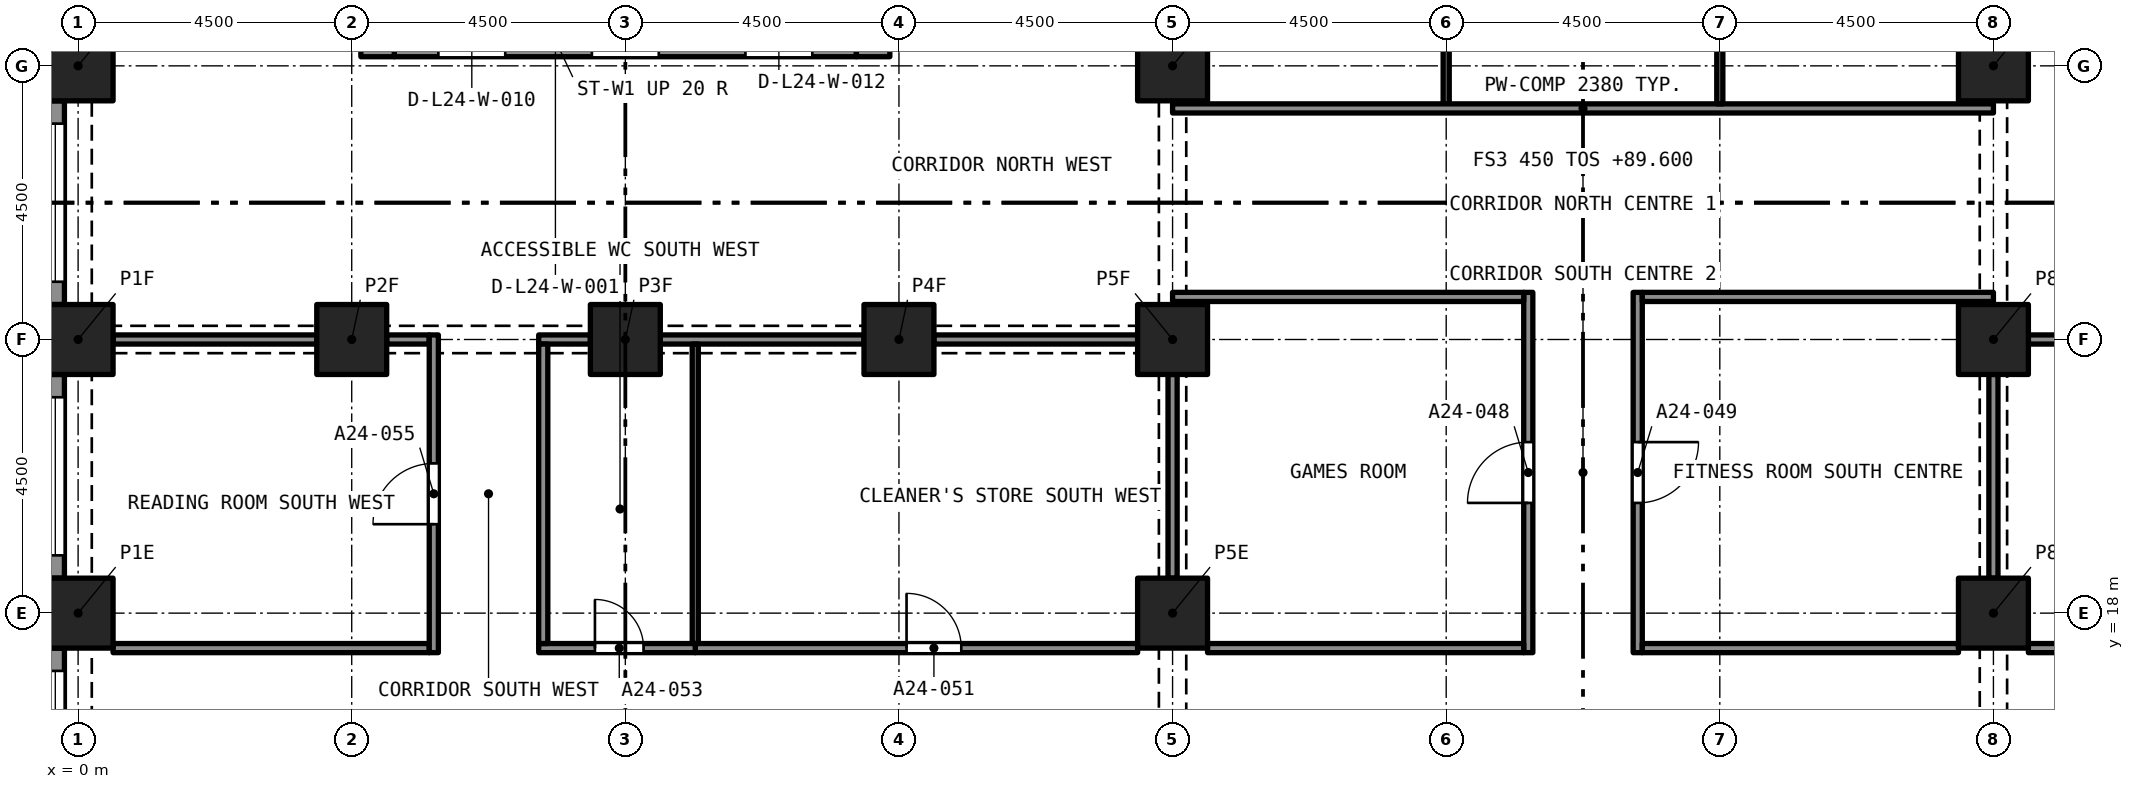
"""IFC4 building model, lengths in metres.
Left out: names, types, materials, properties, quantities, classifications, styles, units other than length and angle.
Written with IfcOpenShell. Run it as: python <this file> out.ifc"""

import sys

from ifc_helpers import new_model, si_unit, direction, frame, frame_2d, origin, origin_2d, place, context, subcontext, project, spatial, rectangle, extrude, element, fill, save


model = new_model("IFC4")
c1 = context("Model", 3, precision=1e-05, world=origin(), true_north=direction((0.0, 1.0)))
c2 = subcontext(c1, "Body", "Model", "MODEL_VIEW")
j1 = project(units=[si_unit("LENGTHUNIT", "METRE"), si_unit("PLANEANGLEUNIT", "RADIAN")], contexts=[c1])
p1 = place(None, origin())
s1 = spatial("IfcSite", under=j1, at=p1, CompositionType="ELEMENT")
p2 = place(p1, origin())
s2 = spatial("IfcBuilding", under=s1, at=p2, CompositionType="ELEMENT")
p3 = place(p2, frame((0.0, 0.0, 89.6)))
s3 = spatial("IfcBuildingStorey", under=s2, at=p3, CompositionType="ELEMENT", Elevation=89.6)
for number, where, z_axis, x_axis in (
    (1, (0.0, 18.0, 0.0), (0.0, 0.0, 1.0), (1.0, 0.0, 0.0)),
    (2, (18.0, 18.0, 0.0), (0.0, 0.0, 1.0), (1.0, 0.0, 0.0)),
    (3, (31.5, 18.0, 0.0), (0.0, 0.0, 1.0), (1.0, 0.0, 0.0)),
    (4, (0.0, 22.5, 0.0), (0.0, 0.0, 1.0), (1.0, 0.0, 0.0)),
    (5, (4.5, 22.5, 0.0), (0.0, 0.0, 1.0), (1.0, 0.0, 0.0)),
    (6, (9.0, 22.5, 0.0), (0.0, 0.0, 1.0), (1.0, 0.0, 0.0)),
    (7, (13.5, 22.5, 0.0), (0.0, 0.0, 1.0), (1.0, 0.0, 0.0)),
    (8, (18.0, 22.5, 0.0), (0.0, 0.0, 1.0), (1.0, 0.0, 0.0)),
    (9, (31.5, 22.5, 0.0), (0.0, 0.0, 1.0), (1.0, 0.0, 0.0)),
    (10, (0.0, 27.0, 0.0), (0.0, 0.0, 1.0), (1.0, 0.0, 0.0)),
    (11, (18.0, 27.0, 0.0), (0.0, 0.0, 1.0), (1.0, 0.0, 0.0)),
    (12, (31.5, 27.0, 0.0), (0.0, 0.0, 1.0), (1.0, 0.0, 0.0)),
):
    element("IfcColumn", number, at=place(p3, frame(where, z_axis=z_axis, x_axis=x_axis)), inside=s3, PredefinedType="COLUMN", context=c2, shape_type="SweptSolid", body=[
        extrude(rectangle(XDim=1.15, YDim=1.15, at=origin_2d()), origin(), (0.0, 0.0, 1.0), 3.2),
    ])
p4 = place(p3, frame((5.2, 27.425, 0.0), z_axis=(0.0, 0.0, 1.0), x_axis=(1.0, 0.0, 0.0)))
e13 = element("IfcWall", 13, at=p4, inside=s3, PredefinedType="SOLIDWALL", context=c2, shape_type="SweptSolid", body=[
    extrude(rectangle(XDim=7.6, YDim=0.55, at=frame_2d((3.8, 0.0))), origin(), (0.0, 0.0, 1.0), 3.2),
])
p5 = place(p4, frame((0.725, 0.0, 0.0)))
e14 = element("IfcOpeningElement", 14, at=p5, cuts=e13, PredefinedType="OPENING", context=c2, shape_type="SweptSolid", body=[
    extrude(rectangle(XDim=1.1, YDim=2.1, at=frame_2d((0.55, 1.05))), frame((0.0, 0.285, 0.0), z_axis=(0.0, -1.0, 0.0), x_axis=(1.0, 0.0, 0.0)), (0.0, 0.0, 1.0), 0.57),
])
p6 = place(p4, frame((3.25, 0.0, 0.0)))
e15 = element("IfcOpeningElement", 15, at=p6, cuts=e13, PredefinedType="OPENING", context=c2, shape_type="SweptSolid", body=[
    extrude(rectangle(XDim=1.1, YDim=2.1, at=frame_2d((0.55, 1.05))), frame((0.0, 0.285, 0.0), z_axis=(0.0, -1.0, 0.0), x_axis=(1.0, 0.0, 0.0)), (0.0, 0.0, 1.0), 0.57),
])
p7 = place(p4, frame((5.775, 0.0, 0.0)))
e16 = element("IfcOpeningElement", 16, at=p7, cuts=e13, PredefinedType="OPENING", context=c2, shape_type="SweptSolid", body=[
    extrude(rectangle(XDim=1.1, YDim=2.1, at=frame_2d((0.55, 1.05))), frame((0.0, 0.285, 0.0), z_axis=(0.0, -1.0, 0.0), x_axis=(1.0, 0.0, 0.0)), (0.0, 0.0, 1.0), 0.57),
])
p8 = place(p3, frame((4.925, 27.15, 0.0), z_axis=(0.0, 0.0, 1.0), x_axis=(0.0, 1.0, 0.0)))
e17 = element("IfcWall", 17, at=p8, inside=s3, PredefinedType="SOLIDWALL", context=c2, shape_type="SweptSolid", body=[
    extrude(rectangle(XDim=13.2, YDim=0.55, at=frame_2d((6.6, 0.0))), origin(), (0.0, 0.0, 1.0), 3.2),
])
p9 = place(p8, frame((8.8, 0.0, 0.0)))
e18 = element("IfcOpeningElement", 18, at=p9, cuts=e17, PredefinedType="OPENING", context=c2, shape_type="SweptSolid", body=[
    extrude(rectangle(XDim=1.2, YDim=2.1, at=frame_2d((0.6, 1.05))), frame((0.0, 0.285, 0.0), z_axis=(0.0, -1.0, 0.0), x_axis=(1.0, 0.0, 0.0)), (0.0, 0.0, 1.0), 0.57),
])
p10 = place(p3, frame((13.075, 27.15, 0.0), z_axis=(0.0, 0.0, 1.0), x_axis=(0.0, 1.0, 0.0)))
e19 = element("IfcWall", 19, at=p10, inside=s3, PredefinedType="SOLIDWALL", context=c2, shape_type="SweptSolid", body=[
    extrude(rectangle(XDim=13.2, YDim=0.55, at=frame_2d((6.6, 0.0))), origin(), (0.0, 0.0, 1.0), 3.2),
])
p11 = place(p10, frame((10.95, 0.0, 0.0)))
e20 = element("IfcOpeningElement", 20, at=p11, cuts=e19, PredefinedType="OPENING", context=c2, shape_type="SweptSolid", body=[
    extrude(rectangle(XDim=1.1, YDim=2.1, at=frame_2d((0.55, 1.05))), frame((0.0, 0.285, 0.0), z_axis=(0.0, -1.0, 0.0), x_axis=(1.0, 0.0, 0.0)), (0.0, 0.0, 1.0), 0.57),
])
p12 = place(p10, frame((8.8, 0.0, 0.0)))
e21 = element("IfcOpeningElement", 21, at=p12, cuts=e19, PredefinedType="OPENING", context=c2, shape_type="SweptSolid", body=[
    extrude(rectangle(XDim=1.2, YDim=2.1, at=frame_2d((0.6, 1.05))), frame((0.0, 0.285, 0.0), z_axis=(0.0, -1.0, 0.0), x_axis=(1.0, 0.0, 0.0)), (0.0, 0.0, 1.0), 0.57),
])
p13 = place(p3, frame((-0.375, 23.075, 0.0), z_axis=(0.0, 0.0, 1.0), x_axis=(0.0, 1.0, 0.0)))
e22 = element("IfcWall", 22, at=p13, inside=s3, PredefinedType="SOLIDWALL", context=c2, shape_type="SweptSolid", body=[
    extrude(rectangle(XDim=3.35, YDim=0.3, at=frame_2d((1.675, 0.0))), origin(), (0.0, 0.0, 1.0), 3.2),
])
p14 = place(p13, frame((0.375, 0.0, 0.45)))
e23 = element("IfcOpeningElement", 23, at=p14, cuts=e22, PredefinedType="OPENING", context=c2, shape_type="SweptSolid", body=[
    extrude(rectangle(XDim=2.6, YDim=1.95, at=frame_2d((1.3, 0.975))), frame((0.0, 0.16, 0.0), z_axis=(0.0, -1.0, 0.0), x_axis=(1.0, 0.0, 0.0)), (0.0, 0.0, 1.0), 0.32),
])
p15 = place(p3, frame((-0.375, 18.575, 0.0), z_axis=(0.0, 0.0, 1.0), x_axis=(0.0, 1.0, 0.0)))
e24 = element("IfcWall", 24, at=p15, inside=s3, PredefinedType="SOLIDWALL", context=c2, shape_type="SweptSolid", body=[
    extrude(rectangle(XDim=3.35, YDim=0.3, at=frame_2d((1.675, 0.0))), origin(), (0.0, 0.0, 1.0), 3.2),
])
p16 = place(p15, frame((0.375, 0.0, 0.45)))
e25 = element("IfcOpeningElement", 25, at=p16, cuts=e24, PredefinedType="OPENING", context=c2, shape_type="SweptSolid", body=[
    extrude(rectangle(XDim=2.6, YDim=1.95, at=frame_2d((1.3, 0.975))), frame((0.0, 0.16, 0.0), z_axis=(0.0, -1.0, 0.0), x_axis=(1.0, 0.0, 0.0)), (0.0, 0.0, 1.0), 0.32),
])
p17 = place(p3, frame((-0.375, 14.075, 0.0), z_axis=(0.0, 0.0, 1.0), x_axis=(0.0, 1.0, 0.0)))
e26 = element("IfcWall", 26, at=p17, inside=s3, PredefinedType="SOLIDWALL", context=c2, shape_type="SweptSolid", body=[
    extrude(rectangle(XDim=3.35, YDim=0.3, at=frame_2d((1.675, 0.0))), origin(), (0.0, 0.0, 1.0), 3.2),
])
p18 = place(p17, frame((0.375, 0.0, 0.45)))
e27 = element("IfcOpeningElement", 27, at=p18, cuts=e26, PredefinedType="OPENING", context=c2, shape_type="SweptSolid", body=[
    extrude(rectangle(XDim=2.6, YDim=1.95, at=frame_2d((1.3, 0.975))), frame((0.0, 0.16, 0.0), z_axis=(0.0, -1.0, 0.0), x_axis=(1.0, 0.0, 0.0)), (0.0, 0.0, 1.0), 0.32),
])
p19 = place(p3, frame((23.85, 17.35, 0.0), z_axis=(0.0, 0.0, 1.0), x_axis=(0.0, 1.0, 0.0)))
e28 = element("IfcWall", 28, at=p19, inside=s3, PredefinedType="PARTITIONING", context=c2, shape_type="SweptSolid", body=[
    extrude(rectangle(XDim=5.925, YDim=0.15, at=frame_2d((2.962, 0.0))), origin(), (0.0, 0.0, 1.0), 2.75),
])
p20 = place(p19, frame((2.462, 0.0, 0.0)))
e29 = element("IfcOpeningElement", 29, at=p20, cuts=e28, PredefinedType="OPENING", context=c2, shape_type="SweptSolid", body=[
    extrude(rectangle(XDim=1.0, YDim=2.1, at=frame_2d((0.5, 1.05))), frame((0.0, 0.085, 0.0), z_axis=(0.0, -1.0, 0.0), x_axis=(1.0, 0.0, 0.0)), (0.0, 0.0, 1.0), 0.17),
])
p21 = place(p3, frame((25.65, 23.275, 0.0), z_axis=(0.0, 0.0, 1.0), x_axis=(0.0, -1.0, 0.0)))
e30 = element("IfcWall", 30, at=p21, inside=s3, PredefinedType="PARTITIONING", context=c2, shape_type="SweptSolid", body=[
    extrude(rectangle(XDim=5.925, YDim=0.15, at=frame_2d((2.962, 0.0))), origin(), (0.0, 0.0, 1.0), 2.75),
])
p22 = place(p21, frame((2.462, 0.0, 0.0)))
e31 = element("IfcOpeningElement", 31, at=p22, cuts=e30, PredefinedType="OPENING", context=c2, shape_type="SweptSolid", body=[
    extrude(rectangle(XDim=1.0, YDim=2.1, at=frame_2d((0.5, 1.05))), frame((0.0, 0.085, 0.0), z_axis=(0.0, -1.0, 0.0), x_axis=(1.0, 0.0, 0.0)), (0.0, 0.0, 1.0), 0.17),
])
for number, where, z_axis, x_axis in (
    (32, (18.575, 17.425, 0.0), (0.0, 0.0, 1.0), (1.0, 0.0, 0.0)),
    (33, (25.725, 17.425, 0.0), (0.0, 0.0, 1.0), (1.0, 0.0, 0.0)),
):
    element("IfcWall", number, at=place(p3, frame(where, z_axis=z_axis, x_axis=x_axis)), inside=s3, PredefinedType="PARTITIONING", context=c2, shape_type="SweptSolid", body=[
        extrude(rectangle(XDim=5.2, YDim=0.15, at=frame_2d((2.6, 0.0))), origin(), (0.0, 0.0, 1.0), 2.75),
    ])
p23 = place(p3, frame((32.075, 17.425, 0.0), z_axis=(0.0, 0.0, 1.0), x_axis=(1.0, 0.0, 0.0)))
e34 = element("IfcWall", 34, at=p23, inside=s3, PredefinedType="PARTITIONING", context=c2, shape_type="SweptSolid", body=[
    extrude(rectangle(XDim=7.275, YDim=0.15, at=frame_2d((3.638, 0.0))), origin(), (0.0, 0.0, 1.0), 2.9),
])
p24 = place(p23, frame((2.9, 0.0, 0.0)))
e35 = element("IfcOpeningElement", 35, at=p24, cuts=e34, PredefinedType="OPENING", context=c2, shape_type="SweptSolid", body=[
    extrude(rectangle(XDim=0.9, YDim=2.1, at=frame_2d((0.45, 1.05))), frame((0.0, 0.085, 0.0), z_axis=(0.0, -1.0, 0.0), x_axis=(1.0, 0.0, 0.0)), (0.0, 0.0, 1.0), 0.17),
])
p25 = place(p3, frame((10.15, 17.425, 0.0), z_axis=(0.0, 0.0, 1.0), x_axis=(1.0, 0.0, 0.0)))
e36 = element("IfcWall", 36, at=p25, inside=s3, PredefinedType="PARTITIONING", context=c2, shape_type="SweptSolid", body=[
    extrude(rectangle(XDim=7.275, YDim=0.15, at=frame_2d((3.638, 0.0))), origin(), (0.0, 0.0, 1.0), 2.9),
])
p26 = place(p25, frame((3.475, 0.0, 0.0)))
e37 = element("IfcOpeningElement", 37, at=p26, cuts=e36, PredefinedType="OPENING", context=c2, shape_type="SweptSolid", body=[
    extrude(rectangle(XDim=0.9, YDim=2.1, at=frame_2d((0.45, 1.05))), frame((0.0, 0.085, 0.0), z_axis=(0.0, -1.0, 0.0), x_axis=(1.0, 0.0, 0.0)), (0.0, 0.0, 1.0), 0.17),
])
p27 = place(p3, frame((7.575, 17.425, 0.0), z_axis=(0.0, 0.0, 1.0), x_axis=(1.0, 0.0, 0.0)))
e38 = element("IfcWall", 38, at=p27, inside=s3, PredefinedType="PARTITIONING", context=c2, shape_type="SweptSolid", body=[
    extrude(rectangle(XDim=2.575, YDim=0.15, at=frame_2d((1.288, 0.0))), origin(), (0.0, 0.0, 1.0), 2.9),
])
p28 = place(p27, frame((0.925, 0.0, 0.0)))
e39 = element("IfcOpeningElement", 39, at=p28, cuts=e38, PredefinedType="OPENING", context=c2, shape_type="SweptSolid", body=[
    extrude(rectangle(XDim=0.8, YDim=2.1, at=frame_2d((0.4, 1.05))), frame((0.0, 0.085, 0.0), z_axis=(0.0, -1.0, 0.0), x_axis=(1.0, 0.0, 0.0)), (0.0, 0.0, 1.0), 0.17),
])
p29 = place(p3, frame((0.575, 17.425, 0.0), z_axis=(0.0, 0.0, 1.0), x_axis=(1.0, 0.0, 0.0)))
e40 = element("IfcWall", 40, at=p29, inside=s3, PredefinedType="PARTITIONING", context=c2, shape_type="SweptSolid", body=[
    extrude(rectangle(XDim=5.2, YDim=0.15, at=frame_2d((2.6, 0.0))), origin(), (0.0, 0.0, 1.0), 2.9),
])
p30 = place(p3, frame((22.5, 26.375, 0.0), z_axis=(0.0, 0.0, 1.0), x_axis=(0.0, 1.0, 0.0)))
e41 = element("IfcWall", 41, at=p30, inside=s3, PredefinedType="PARTITIONING", context=c2, shape_type="SweptSolid", body=[
    extrude(rectangle(XDim=10.125, YDim=0.1, at=frame_2d((5.062, 0.0))), origin(), (0.0, 0.0, 1.0), 2.75),
])
p31 = place(p3, frame((18.0, 26.3, 0.0), z_axis=(0.0, 0.0, 1.0), x_axis=(1.0, 0.0, 0.0)))
e42 = element("IfcWall", 42, at=p31, inside=s3, PredefinedType="PARTITIONING", context=c2, shape_type="SweptSolid", body=[
    extrude(rectangle(XDim=13.5, YDim=0.15, at=frame_2d((6.75, 0.0))), origin(), (0.0, 0.0, 1.0), 2.38),
])
p32 = place(p3, frame((27.0, 26.375, 0.0), z_axis=(0.0, 0.0, 1.0), x_axis=(0.0, 1.0, 0.0)))
e43 = element("IfcWall", 43, at=p32, inside=s3, PredefinedType="PARTITIONING", context=c2, shape_type="SweptSolid", body=[
    extrude(rectangle(XDim=10.125, YDim=0.1, at=frame_2d((5.062, 0.0))), origin(), (0.0, 0.0, 1.0), 2.75),
])
p33 = place(p3, frame((18.0, 23.2, 0.0), z_axis=(0.0, 0.0, 1.0), x_axis=(1.0, 0.0, 0.0)))
e44 = element("IfcWall", 44, at=p33, inside=s3, PredefinedType="PARTITIONING", context=c2, shape_type="SweptSolid", body=[
    extrude(rectangle(XDim=5.775, YDim=0.15, at=frame_2d((2.887, 0.0))), origin(), (0.0, 0.0, 1.0), 2.75),
])
p34 = place(p3, frame((18.0, 18.575, 0.0), z_axis=(0.0, 0.0, 1.0), x_axis=(0.0, 1.0, 0.0)))
e45 = element("IfcWall", 45, at=p34, inside=s3, PredefinedType="PARTITIONING", context=c2, shape_type="SweptSolid", body=[
    extrude(rectangle(XDim=3.35, YDim=0.15, at=frame_2d((1.675, 0.0))), origin(), (0.0, 0.0, 1.0), 2.38),
])
p35 = place(p3, frame((25.725, 23.2, 0.0), z_axis=(0.0, 0.0, 1.0), x_axis=(1.0, 0.0, 0.0)))
e46 = element("IfcWall", 46, at=p35, inside=s3, PredefinedType="PARTITIONING", context=c2, shape_type="SweptSolid", body=[
    extrude(rectangle(XDim=5.775, YDim=0.15, at=frame_2d((2.887, 0.0))), origin(), (0.0, 0.0, 1.0), 2.75),
])
p36 = place(p3, frame((31.5, 18.575, 0.0), z_axis=(0.0, 0.0, 1.0), x_axis=(0.0, 1.0, 0.0)))
e47 = element("IfcWall", 47, at=p36, inside=s3, PredefinedType="PARTITIONING", context=c2, shape_type="SweptSolid", body=[
    extrude(rectangle(XDim=3.35, YDim=0.15, at=frame_2d((1.675, 0.0))), origin(), (0.0, 0.0, 1.0), 2.38),
])
p37 = place(p3, frame((32.075, 22.5, 0.0), z_axis=(0.0, 0.0, 1.0), x_axis=(1.0, 0.0, 0.0)))
e48 = element("IfcWall", 48, at=p37, inside=s3, PredefinedType="PARTITIONING", context=c2, shape_type="SweptSolid", body=[
    extrude(rectangle(XDim=9.85, YDim=0.15, at=frame_2d((4.925, 0.0))), origin(), (0.0, 0.0, 1.0), 2.9),
])
for number, where, z_axis, x_axis in (
    (49, (14.075, 22.5, 0.0), (0.0, 0.0, 1.0), (1.0, 0.0, 0.0)),
    (50, (9.575, 22.5, 0.0), (0.0, 0.0, 1.0), (1.0, 0.0, 0.0)),
):
    element("IfcWall", number, at=place(p3, frame(where, z_axis=z_axis, x_axis=x_axis)), inside=s3, PredefinedType="PARTITIONING", context=c2, shape_type="SweptSolid", body=[
        extrude(rectangle(XDim=3.35, YDim=0.15, at=frame_2d((1.675, 0.0))), origin(), (0.0, 0.0, 1.0), 2.38),
    ])
p38 = place(p3, frame((7.575, 22.5, 0.0), z_axis=(0.0, 0.0, 1.0), x_axis=(1.0, 0.0, 0.0)))
e51 = element("IfcWall", 51, at=p38, inside=s3, PredefinedType="PARTITIONING", context=c2, shape_type="SweptSolid", body=[
    extrude(rectangle(XDim=0.85, YDim=0.15, at=frame_2d((0.425, 0.0))), origin(), (0.0, 0.0, 1.0), 2.38),
])
p39 = place(p3, frame((5.075, 22.5, 0.0), z_axis=(0.0, 0.0, 1.0), x_axis=(1.0, 0.0, 0.0)))
e52 = element("IfcWall", 52, at=p39, inside=s3, PredefinedType="PARTITIONING", context=c2, shape_type="SweptSolid", body=[
    extrude(rectangle(XDim=0.7, YDim=0.15, at=frame_2d((0.35, 0.0))), origin(), (0.0, 0.0, 1.0), 2.38),
])
p40 = place(p3, frame((0.575, 22.5, 0.0), z_axis=(0.0, 0.0, 1.0), x_axis=(1.0, 0.0, 0.0)))
e53 = element("IfcWall", 53, at=p40, inside=s3, PredefinedType="PARTITIONING", context=c2, shape_type="SweptSolid", body=[
    extrude(rectangle(XDim=3.35, YDim=0.15, at=frame_2d((1.675, 0.0))), origin(), (0.0, 0.0, 1.0), 2.38),
])
p41 = place(p3, frame((7.65, 17.5, 0.0), z_axis=(0.0, 0.0, 1.0), x_axis=(0.0, 1.0, 0.0)))
e54 = element("IfcWall", 54, at=p41, inside=s3, PredefinedType="PARTITIONING", context=c2, shape_type="SweptSolid", body=[
    extrude(rectangle(XDim=4.925, YDim=0.15, at=frame_2d((2.462, 0.0))), origin(), (0.0, 0.0, 1.0), 2.9),
])
p42 = place(p3, frame((5.85, 17.35, 0.0), z_axis=(0.0, 0.0, 1.0), x_axis=(0.0, 1.0, 0.0)))
e55 = element("IfcWall", 55, at=p42, inside=s3, PredefinedType="PARTITIONING", context=c2, shape_type="SweptSolid", body=[
    extrude(rectangle(XDim=5.225, YDim=0.15, at=frame_2d((2.612, 0.0))), origin(), (0.0, 0.0, 1.0), 2.9),
])
p43 = place(p42, frame((2.113, 0.0, 0.0)))
e56 = element("IfcOpeningElement", 56, at=p43, cuts=e55, PredefinedType="OPENING", context=c2, shape_type="SweptSolid", body=[
    extrude(rectangle(XDim=1.0, YDim=2.1, at=frame_2d((0.5, 1.05))), frame((0.0, 0.085, 0.0), z_axis=(0.0, -1.0, 0.0), x_axis=(1.0, 0.0, 0.0)), (0.0, 0.0, 1.0), 0.17),
])
p44 = place(p3, frame((10.15, 17.5, 0.0), z_axis=(0.0, 0.0, 1.0), x_axis=(0.0, 1.0, 0.0)))
e57 = element("IfcWall", 57, at=p44, inside=s3, PredefinedType="PARTITIONING", context=c2, shape_type="SweptSolid", body=[
    extrude(rectangle(XDim=4.925, YDim=0.1, at=frame_2d((2.462, 0.0))), origin(), (0.0, 0.0, 1.0), 2.9),
])
p45 = place(p14, origin())
e58 = element("IfcWindow", 58, at=p45, inside=s3, PartitioningType="SINGLE_PANEL", PredefinedType="WINDOW", context=c2, shape_type="SweptSolid", body=[
    extrude(rectangle(XDim=2.6, YDim=1.95, at=frame_2d((1.3, 0.975))), frame((0.0, 0.03, 0.0), z_axis=(0.0, -1.0, 0.0), x_axis=(1.0, 0.0, 0.0)), (0.0, 0.0, 1.0), 0.06),
])
fill(e23, e58)
p46 = place(p16, origin())
e59 = element("IfcWindow", 59, at=p46, inside=s3, PartitioningType="SINGLE_PANEL", PredefinedType="WINDOW", context=c2, shape_type="SweptSolid", body=[
    extrude(rectangle(XDim=2.6, YDim=1.95, at=frame_2d((1.3, 0.975))), frame((0.0, 0.03, 0.0), z_axis=(0.0, -1.0, 0.0), x_axis=(1.0, 0.0, 0.0)), (0.0, 0.0, 1.0), 0.06),
])
fill(e25, e59)
p47 = place(p18, origin())
e60 = element("IfcWindow", 60, at=p47, inside=s3, PartitioningType="SINGLE_PANEL", PredefinedType="WINDOW", context=c2, shape_type="SweptSolid", body=[
    extrude(rectangle(XDim=2.6, YDim=1.95, at=frame_2d((1.3, 0.975))), frame((0.0, 0.03, 0.0), z_axis=(0.0, -1.0, 0.0), x_axis=(1.0, 0.0, 0.0)), (0.0, 0.0, 1.0), 0.06),
])
fill(e27, e60)
p48 = place(p20, origin())
e61 = element("IfcDoor", 61, at=p48, inside=s3, OperationType="SINGLE_SWING_RIGHT", PredefinedType="DOOR", context=c2, shape_type="SweptSolid", body=[
    extrude(rectangle(XDim=1.0, YDim=2.1, at=frame_2d((0.5, 1.05))), frame((0.0, 0.025, 0.0), z_axis=(0.0, -1.0, 0.0), x_axis=(1.0, 0.0, 0.0)), (0.0, 0.0, 1.0), 0.05),
])
fill(e29, e61)
p49 = place(p22, origin())
e62 = element("IfcDoor", 62, at=p49, inside=s3, OperationType="SINGLE_SWING_RIGHT", PredefinedType="DOOR", context=c2, shape_type="SweptSolid", body=[
    extrude(rectangle(XDim=1.0, YDim=2.1, at=frame_2d((0.5, 1.05))), frame((0.0, 0.025, 0.0), z_axis=(0.0, -1.0, 0.0), x_axis=(1.0, 0.0, 0.0)), (0.0, 0.0, 1.0), 0.05),
])
fill(e31, e62)
p50 = place(p26, origin())
e63 = element("IfcDoor", 63, at=p50, inside=s3, OperationType="SINGLE_SWING_RIGHT", PredefinedType="DOOR", context=c2, shape_type="SweptSolid", body=[
    extrude(rectangle(XDim=0.9, YDim=2.1, at=frame_2d((0.45, 1.05))), frame((0.0, 0.025, 0.0), z_axis=(0.0, -1.0, 0.0), x_axis=(1.0, 0.0, 0.0)), (0.0, 0.0, 1.0), 0.05),
])
fill(e37, e63)
p51 = place(p28, origin())
e64 = element("IfcDoor", 64, at=p51, inside=s3, OperationType="SINGLE_SWING_RIGHT", PredefinedType="DOOR", context=c2, shape_type="SweptSolid", body=[
    extrude(rectangle(XDim=0.8, YDim=2.1, at=frame_2d((0.4, 1.05))), frame((0.0, 0.025, 0.0), z_axis=(0.0, -1.0, 0.0), x_axis=(1.0, 0.0, 0.0)), (0.0, 0.0, 1.0), 0.05),
])
fill(e39, e64)
p52 = place(p43, origin())
e65 = element("IfcDoor", 65, at=p52, inside=s3, OperationType="SINGLE_SWING_LEFT", PredefinedType="DOOR", context=c2, shape_type="SweptSolid", body=[
    extrude(rectangle(XDim=1.0, YDim=2.1, at=frame_2d((0.5, 1.05))), frame((0.0, 0.025, 0.0), z_axis=(0.0, -1.0, 0.0), x_axis=(1.0, 0.0, 0.0)), (0.0, 0.0, 1.0), 0.05),
])
fill(e56, e65)
save(model, sys.argv[1])
